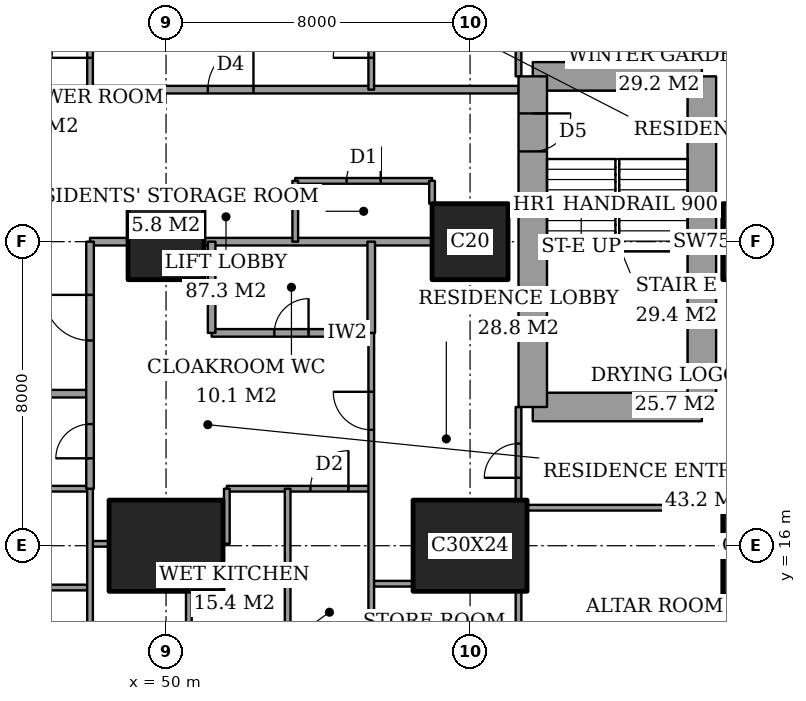
"""IFC4 building model, lengths in metres.
Left out: names, types, materials, properties, quantities, classifications, styles, units other than length and angle.
Written with IfcOpenShell. Run it as: python <this file> out.ifc"""

import sys

from ifc_helpers import new_model, si_unit, direction, frame, frame_2d, origin, origin_2d, place, context, subcontext, project, spatial, rectangle, extrude, element, fill, save


model = new_model("IFC4")
c1 = context("Model", 3, precision=1e-05, world=origin(), true_north=direction((0.0, 1.0)))
c2 = subcontext(c1, "Body", "Model", "MODEL_VIEW")
j1 = project(units=[si_unit("LENGTHUNIT", "METRE"), si_unit("PLANEANGLEUNIT", "RADIAN")], contexts=[c1])
p1 = place(None, origin())
s1 = spatial("IfcSite", under=j1, at=p1, CompositionType="ELEMENT")
p2 = place(p1, origin())
s2 = spatial("IfcBuilding", under=s1, at=p2, CompositionType="ELEMENT")
p3 = place(p2, frame((0.0, 0.0, 161.0)))
s3 = spatial("IfcBuildingStorey", under=s2, at=p3, CompositionType="ELEMENT", Elevation=161.0)
p4 = place(p3, frame((50.0, 16.0, 0.0), z_axis=(0.0, 0.0, 1.0), x_axis=(1.0, 0.0, 0.0)))
e1 = element("IfcColumn", 1, at=p4, inside=s3, PredefinedType="COLUMN", context=c2, shape_type="SweptSolid", body=[
    extrude(rectangle(XDim=3.0, YDim=2.4, at=origin_2d()), origin(), (0.0, 0.0, 1.0), 3.6),
])
p5 = place(p3, frame((50.0, 24.0, 0.0), z_axis=(0.0, 0.0, 1.0), x_axis=(1.0, 0.0, 0.0)))
e2 = element("IfcColumn", 2, at=p5, inside=s3, PredefinedType="COLUMN", context=c2, shape_type="SweptSolid", body=[
    extrude(rectangle(XDim=2.0, YDim=2.0, at=origin_2d()), origin(), (0.0, 0.0, 1.0), 3.6),
])
p6 = place(p3, frame((58.0, 16.0, 0.0), z_axis=(0.0, 0.0, 1.0), x_axis=(1.0, 0.0, 0.0)))
e3 = element("IfcColumn", 3, at=p6, inside=s3, PredefinedType="COLUMN", context=c2, shape_type="SweptSolid", body=[
    extrude(rectangle(XDim=3.0, YDim=2.4, at=origin_2d()), origin(), (0.0, 0.0, 1.0), 3.6),
])
p7 = place(p3, frame((58.0, 24.0, 0.0), z_axis=(0.0, 0.0, 1.0), x_axis=(1.0, 0.0, 0.0)))
e4 = element("IfcColumn", 4, at=p7, inside=s3, PredefinedType="COLUMN", context=c2, shape_type="SweptSolid", body=[
    extrude(rectangle(XDim=2.0, YDim=2.0, at=origin_2d()), origin(), (0.0, 0.0, 1.0), 3.6),
])
p8 = place(p3, frame((65.65, 16.0, 0.0), z_axis=(0.0, 0.0, 1.0), x_axis=(0.0, 1.0, 0.0)))
e5 = element("IfcColumn", 5, at=p8, inside=s3, PredefinedType="COLUMN", context=c2, shape_type="SweptSolid", body=[
    extrude(rectangle(XDim=2.6, YDim=2.0, at=origin_2d()), origin(), (0.0, 0.0, 1.0), 3.6),
])
p9 = place(p3, frame((65.65, 24.0, 0.0), z_axis=(0.0, 0.0, 1.0), x_axis=(1.0, 0.0, 0.0)))
e6 = element("IfcColumn", 6, at=p9, inside=s3, PredefinedType="COLUMN", context=c2, shape_type="SweptSolid", body=[
    extrude(rectangle(XDim=2.0, YDim=2.0, at=origin_2d()), origin(), (0.0, 0.0, 1.0), 3.6),
])
p10 = place(p3, frame((59.65, 19.65, 0.0), z_axis=(0.0, 0.0, 1.0), x_axis=(1.0, 0.0, 0.0)))
e7 = element("IfcWall", 7, at=p10, inside=s3, PredefinedType="SHEAR", context=c2, shape_type="SweptSolid", body=[
    extrude(rectangle(XDim=4.45, YDim=0.75, at=frame_2d((2.225, 0.0))), origin(), (0.0, 0.0, 1.0), 3.6),
])
p11 = place(p3, frame((64.1, 19.65, 0.0), z_axis=(0.0, 0.0, 1.0), x_axis=(0.0, 1.0, 0.0)))
e8 = element("IfcWall", 8, at=p11, inside=s3, PredefinedType="SHEAR", context=c2, shape_type="SweptSolid", body=[
    extrude(rectangle(XDim=8.7, YDim=0.75, at=frame_2d((4.35, 0.0))), origin(), (0.0, 0.0, 1.0), 3.6),
])
p12 = place(p3, frame((64.1, 28.35, 0.0), z_axis=(0.0, 0.0, 1.0), x_axis=(-1.0, 0.0, 0.0)))
e9 = element("IfcWall", 9, at=p12, inside=s3, PredefinedType="SHEAR", context=c2, shape_type="SweptSolid", body=[
    extrude(rectangle(XDim=4.45, YDim=0.75, at=frame_2d((2.225, 0.0))), origin(), (0.0, 0.0, 1.0), 3.6),
])
p13 = place(p3, frame((59.65, 28.35, 0.0), z_axis=(0.0, 0.0, 1.0), x_axis=(0.0, -1.0, 0.0)))
e10 = element("IfcWall", 10, at=p13, inside=s3, PredefinedType="SHEAR", context=c2, shape_type="SweptSolid", body=[
    extrude(rectangle(XDim=8.7, YDim=0.75, at=frame_2d((4.35, 0.0))), origin(), (0.0, 0.0, 1.0), 3.6),
])
p14 = place(p13, frame((0.975, 0.0, 0.0)))
e11 = element("IfcOpeningElement", 11, at=p14, cuts=e10, PredefinedType="OPENING", context=c2, shape_type="SweptSolid", body=[
    extrude(rectangle(XDim=1.0, YDim=2.1, at=frame_2d((0.5, 1.05))), frame((0.0, 0.385, 0.0), z_axis=(0.0, -1.0, 0.0), x_axis=(1.0, 0.0, 0.0)), (0.0, 0.0, 1.0), 0.77),
])
p15 = place(p3, frame((45.6, 14.9, 0.0), z_axis=(0.0, 0.0, 1.0), x_axis=(1.0, 0.0, 0.0)))
e12 = element("IfcWall", 12, at=p15, inside=s3, PredefinedType="PARTITIONING", context=c2, shape_type="SweptSolid", body=[
    extrude(rectangle(XDim=2.4, YDim=0.15, at=frame_2d((1.2, 0.0))), origin(), (0.0, 0.0, 1.0), 3.35),
])
p16 = place(p3, frame((55.4, 15.0, 0.0), z_axis=(0.0, 0.0, 1.0), x_axis=(1.0, 0.0, 0.0)))
e13 = element("IfcWall", 13, at=p16, inside=s3, PredefinedType="PARTITIONING", context=c2, shape_type="SweptSolid", body=[
    extrude(rectangle(XDim=1.1, YDim=0.15, at=frame_2d((0.55, 0.0))), origin(), (0.0, 0.0, 1.0), 3.35),
])
p17 = place(p3, frame((48.0, 16.05, 0.0), z_axis=(0.0, 0.0, 1.0), x_axis=(1.0, 0.0, 0.0)))
e14 = element("IfcWall", 14, at=p17, inside=s3, PredefinedType="PARTITIONING", context=c2, shape_type="SweptSolid", body=[
    extrude(rectangle(XDim=0.5, YDim=0.15, at=frame_2d((0.25, 0.0))), origin(), (0.0, 0.0, 1.0), 2.634),
])
p18 = place(p3, frame((59.5, 17.0, 0.0), z_axis=(0.0, 0.0, 1.0), x_axis=(1.0, 0.0, 0.0)))
e15 = element("IfcWall", 15, at=p18, inside=s3, PredefinedType="PARTITIONING", context=c2, shape_type="SweptSolid", body=[
    extrude(rectangle(XDim=5.15, YDim=0.15, at=frame_2d((2.575, 0.0))), origin(), (0.0, 0.0, 1.0), 3.35),
])
p19 = place(p3, frame((42.0, 17.5, 0.0), z_axis=(0.0, 0.0, 1.0), x_axis=(1.0, 0.0, 0.0)))
e16 = element("IfcWall", 16, at=p19, inside=s3, PredefinedType="PARTITIONING", context=c2, shape_type="SweptSolid", body=[
    extrude(rectangle(XDim=6.0, YDim=0.15, at=frame_2d((3.0, 0.0))), origin(), (0.0, 0.0, 1.0), 3.35),
])
p20 = place(p3, frame((51.6, 17.5, 0.0), z_axis=(0.0, 0.0, 1.0), x_axis=(1.0, 0.0, 0.0)))
e17 = element("IfcWall", 17, at=p20, inside=s3, PredefinedType="PARTITIONING", context=c2, shape_type="SweptSolid", body=[
    extrude(rectangle(XDim=3.8, YDim=0.15, at=frame_2d((1.9, 0.0))), origin(), (0.0, 0.0, 1.0), 3.35),
])
p21 = place(p20, frame((2.2, 0.0, 0.0)))
e18 = element("IfcOpeningElement", 18, at=p21, cuts=e17, PredefinedType="OPENING", context=c2, shape_type="SweptSolid", body=[
    extrude(rectangle(XDim=1.0, YDim=2.1, at=frame_2d((0.5, 1.05))), frame((0.0, 0.085, 0.0), z_axis=(0.0, -1.0, 0.0), x_axis=(1.0, 0.0, 0.0)), (0.0, 0.0, 1.0), 0.17),
])
p22 = place(p3, frame((42.0, 20.0, 0.0), z_axis=(0.0, 0.0, 1.0), x_axis=(1.0, 0.0, 0.0)))
e19 = element("IfcWall", 19, at=p22, inside=s3, PredefinedType="PARTITIONING", context=c2, shape_type="SweptSolid", body=[
    extrude(rectangle(XDim=6.0, YDim=0.2, at=frame_2d((3.0, 0.0))), origin(), (0.0, 0.0, 1.0), 3.35),
])
p23 = place(p3, frame((51.2, 21.6, 0.0), z_axis=(0.0, 0.0, 1.0), x_axis=(1.0, 0.0, 0.0)))
e20 = element("IfcWall", 20, at=p23, inside=s3, PredefinedType="PARTITIONING", context=c2, shape_type="SweptSolid", body=[
    extrude(rectangle(XDim=4.2, YDim=0.2, at=frame_2d((2.1, 0.0))), origin(), (0.0, 0.0, 1.0), 3.35),
])
p24 = place(p23, frame((1.65, 0.0, 0.0)))
e21 = element("IfcOpeningElement", 21, at=p24, cuts=e20, PredefinedType="OPENING", context=c2, shape_type="SweptSolid", body=[
    extrude(rectangle(XDim=0.9, YDim=2.1, at=frame_2d((0.45, 1.05))), frame((0.0, 0.11, 0.0), z_axis=(0.0, -1.0, 0.0), x_axis=(1.0, 0.0, 0.0)), (0.0, 0.0, 1.0), 0.22),
])
p25 = place(p3, frame((48.0, 24.0, 0.0), z_axis=(0.0, 0.0, 1.0), x_axis=(1.0, 0.0, 0.0)))
e22 = element("IfcWall", 22, at=p25, inside=s3, PredefinedType="PARTITIONING", context=c2, shape_type="SweptSolid", body=[
    extrude(rectangle(XDim=1.0, YDim=0.2, at=frame_2d((0.5, 0.0))), origin(), (0.0, 0.0, 1.0), 3.35),
])
p26 = place(p3, frame((51.0, 24.0, 0.0), z_axis=(0.0, 0.0, 1.0), x_axis=(1.0, 0.0, 0.0)))
e23 = element("IfcWall", 23, at=p26, inside=s3, PredefinedType="PARTITIONING", context=c2, shape_type="SweptSolid", body=[
    extrude(rectangle(XDim=6.0, YDim=0.2, at=frame_2d((3.0, 0.0))), origin(), (0.0, 0.0, 1.0), 3.35),
])
p27 = place(p3, frame((53.4, 25.6, 0.0), z_axis=(0.0, 0.0, 1.0), x_axis=(1.0, 0.0, 0.0)))
e24 = element("IfcWall", 24, at=p27, inside=s3, PredefinedType="PARTITIONING", context=c2, shape_type="SweptSolid", body=[
    extrude(rectangle(XDim=3.6, YDim=0.15, at=frame_2d((1.8, 0.0))), origin(), (0.0, 0.0, 1.0), 3.35),
])
p28 = place(p27, frame((1.35, 0.0, 0.0)))
e25 = element("IfcOpeningElement", 25, at=p28, cuts=e24, PredefinedType="OPENING", context=c2, shape_type="SweptSolid", body=[
    extrude(rectangle(XDim=0.9, YDim=2.1, at=frame_2d((0.45, 1.05))), frame((0.0, 0.085, 0.0), z_axis=(0.0, -1.0, 0.0), x_axis=(1.0, 0.0, 0.0)), (0.0, 0.0, 1.0), 0.17),
])
p29 = place(p3, frame((42.0, 28.0, 0.0), z_axis=(0.0, 0.0, 1.0), x_axis=(1.0, 0.0, 0.0)))
e26 = element("IfcWall", 26, at=p29, inside=s3, PredefinedType="PARTITIONING", context=c2, shape_type="SweptSolid", body=[
    extrude(rectangle(XDim=17.275, YDim=0.2, at=frame_2d((8.637, 0.0))), origin(), (0.0, 0.0, 1.0), 3.35),
])
p30 = place(p29, frame((9.1, 0.0, 0.0)))
e27 = element("IfcOpeningElement", 27, at=p30, cuts=e26, PredefinedType="OPENING", context=c2, shape_type="SweptSolid", body=[
    extrude(rectangle(XDim=1.2, YDim=2.4, at=frame_2d((0.6, 1.2))), frame((0.0, 0.11, 0.0), z_axis=(0.0, -1.0, 0.0), x_axis=(1.0, 0.0, 0.0)), (0.0, 0.0, 1.0), 0.22),
])
p31 = place(p3, frame((48.0, 17.5, 0.0), z_axis=(0.0, 0.0, 1.0), x_axis=(0.0, 1.0, 0.0)))
e28 = element("IfcWall", 28, at=p31, inside=s3, PredefinedType="PARTITIONING", context=c2, shape_type="SweptSolid", body=[
    extrude(rectangle(XDim=6.5, YDim=0.2, at=frame_2d((3.25, 0.0))), origin(), (0.0, 0.0, 1.0), 3.35),
])
p32 = place(p31, frame((3.9, 0.0, 0.0)))
e29 = element("IfcOpeningElement", 29, at=p32, cuts=e28, PredefinedType="OPENING", context=c2, shape_type="SweptSolid", body=[
    extrude(rectangle(XDim=1.2, YDim=2.4, at=frame_2d((0.6, 1.2))), frame((0.0, 0.11, 0.0), z_axis=(0.0, -1.0, 0.0), x_axis=(1.0, 0.0, 0.0)), (0.0, 0.0, 1.0), 0.22),
])
p33 = place(p31, frame((0.8, 0.0, 0.0)))
e30 = element("IfcOpeningElement", 30, at=p33, cuts=e28, PredefinedType="OPENING", context=c2, shape_type="SweptSolid", body=[
    extrude(rectangle(XDim=0.9, YDim=2.1, at=frame_2d((0.45, 1.05))), frame((0.0, 0.11, 0.0), z_axis=(0.0, -1.0, 0.0), x_axis=(1.0, 0.0, 0.0)), (0.0, 0.0, 1.0), 0.22),
])
p34 = place(p3, frame((48.0, 11.0, 0.0), z_axis=(0.0, 0.0, 1.0), x_axis=(0.0, 1.0, 0.0)))
e31 = element("IfcWall", 31, at=p34, inside=s3, PredefinedType="PARTITIONING", context=c2, shape_type="SweptSolid", body=[
    extrude(rectangle(XDim=6.5, YDim=0.15, at=frame_2d((3.25, 0.0))), origin(), (0.0, 0.0, 1.0), 3.35),
])
p35 = place(p3, frame((48.0, 28.0, 0.0), z_axis=(0.0, 0.0, 1.0), x_axis=(0.0, 1.0, 0.0)))
e32 = element("IfcWall", 32, at=p35, inside=s3, PredefinedType="PARTITIONING", context=c2, shape_type="SweptSolid", body=[
    extrude(rectangle(XDim=9.4, YDim=0.15, at=frame_2d((4.7, 0.0))), origin(), (0.0, 0.0, 1.0), 3.35),
])
p36 = place(p35, frame((0.837, 0.0, 0.0)))
e33 = element("IfcOpeningElement", 33, at=p36, cuts=e32, PredefinedType="OPENING", context=c2, shape_type="SweptSolid", body=[
    extrude(rectangle(XDim=1.0, YDim=2.1, at=frame_2d((0.5, 1.05))), frame((0.0, 0.085, 0.0), z_axis=(0.0, -1.0, 0.0), x_axis=(1.0, 0.0, 0.0)), (0.0, 0.0, 1.0), 0.17),
])
p37 = place(p3, frame((50.6, 11.0, 0.0), z_axis=(0.0, 0.0, 1.0), x_axis=(0.0, 1.0, 0.0)))
e34 = element("IfcWall", 34, at=p37, inside=s3, PredefinedType="PARTITIONING", context=c2, shape_type="SweptSolid", body=[
    extrude(rectangle(XDim=3.8, YDim=0.15, at=frame_2d((1.9, 0.0))), origin(), (0.0, 0.0, 1.0), 3.35),
])
p38 = place(p3, frame((51.2, 21.6, 0.0), z_axis=(0.0, 0.0, 1.0), x_axis=(0.0, 1.0, 0.0)))
e35 = element("IfcWall", 35, at=p38, inside=s3, PredefinedType="PARTITIONING", context=c2, shape_type="SweptSolid", body=[
    extrude(rectangle(XDim=2.4, YDim=0.2, at=frame_2d((1.2, 0.0))), origin(), (0.0, 0.0, 1.0), 3.35),
])
p39 = place(p3, frame((51.6, 16.05, 0.0), z_axis=(0.0, 0.0, 1.0), x_axis=(0.0, 1.0, 0.0)))
e36 = element("IfcWall", 36, at=p39, inside=s3, PredefinedType="PARTITIONING", context=c2, shape_type="SweptSolid", body=[
    extrude(rectangle(XDim=1.45, YDim=0.15, at=frame_2d((0.725, 0.0))), origin(), (0.0, 0.0, 1.0), 3.35),
])
p40 = place(p3, frame((53.2, 11.0, 0.0), z_axis=(0.0, 0.0, 1.0), x_axis=(0.0, 1.0, 0.0)))
e37 = element("IfcWall", 37, at=p40, inside=s3, PredefinedType="PARTITIONING", context=c2, shape_type="SweptSolid", body=[
    extrude(rectangle(XDim=6.5, YDim=0.15, at=frame_2d((3.25, 0.0))), origin(), (0.0, 0.0, 1.0), 3.35),
])
p41 = place(p3, frame((53.4, 24.0, 0.0), z_axis=(0.0, 0.0, 1.0), x_axis=(0.0, 1.0, 0.0)))
e38 = element("IfcWall", 38, at=p41, inside=s3, PredefinedType="PARTITIONING", context=c2, shape_type="SweptSolid", body=[
    extrude(rectangle(XDim=1.6, YDim=0.15, at=frame_2d((0.8, 0.0))), origin(), (0.0, 0.0, 1.0), 3.35),
])
p42 = place(p3, frame((55.4, 21.6, 0.0), z_axis=(0.0, 0.0, 1.0), x_axis=(0.0, 1.0, 0.0)))
e39 = element("IfcWall", 39, at=p42, inside=s3, PredefinedType="PARTITIONING", context=c2, shape_type="SweptSolid", body=[
    extrude(rectangle(XDim=2.4, YDim=0.2, at=frame_2d((1.2, 0.0))), origin(), (0.0, 0.0, 1.0), 3.35),
])
p43 = place(p3, frame((55.4, 11.0, 0.0), z_axis=(0.0, 0.0, 1.0), x_axis=(0.0, 1.0, 0.0)))
e40 = element("IfcWall", 40, at=p43, inside=s3, PredefinedType="PARTITIONING", context=c2, shape_type="SweptSolid", body=[
    extrude(rectangle(XDim=10.6, YDim=0.15, at=frame_2d((5.3, 0.0))), origin(), (0.0, 0.0, 1.0), 3.35),
])
p44 = place(p43, frame((8.05, 0.0, 0.0)))
e41 = element("IfcOpeningElement", 41, at=p44, cuts=e40, PredefinedType="OPENING", context=c2, shape_type="SweptSolid", body=[
    extrude(rectangle(XDim=1.0, YDim=2.1, at=frame_2d((0.5, 1.05))), frame((0.0, 0.085, 0.0), z_axis=(0.0, -1.0, 0.0), x_axis=(1.0, 0.0, 0.0)), (0.0, 0.0, 1.0), 0.17),
])
p45 = place(p3, frame((55.4, 28.0, 0.0), z_axis=(0.0, 0.0, 1.0), x_axis=(0.0, 1.0, 0.0)))
e42 = element("IfcWall", 42, at=p45, inside=s3, PredefinedType="PARTITIONING", context=c2, shape_type="SweptSolid", body=[
    extrude(rectangle(XDim=9.4, YDim=0.15, at=frame_2d((4.7, 0.0))), origin(), (0.0, 0.0, 1.0), 3.35),
])
p46 = place(p45, frame((0.837, 0.0, 0.0)))
e43 = element("IfcOpeningElement", 43, at=p46, cuts=e42, PredefinedType="OPENING", context=c2, shape_type="SweptSolid", body=[
    extrude(rectangle(XDim=1.0, YDim=2.1, at=frame_2d((0.5, 1.05))), frame((0.0, 0.085, 0.0), z_axis=(0.0, -1.0, 0.0), x_axis=(1.0, 0.0, 0.0)), (0.0, 0.0, 1.0), 0.17),
])
p47 = place(p3, frame((57.0, 25.0, 0.0), z_axis=(0.0, 0.0, 1.0), x_axis=(0.0, 1.0, 0.0)))
e44 = element("IfcWall", 44, at=p47, inside=s3, PredefinedType="PARTITIONING", context=c2, shape_type="SweptSolid", body=[
    extrude(rectangle(XDim=0.6, YDim=0.15, at=frame_2d((0.3, 0.0))), origin(), (0.0, 0.0, 1.0), 3.35),
])
p48 = place(p3, frame((59.275, 11.0, 0.0), z_axis=(0.0, 0.0, 1.0), x_axis=(0.0, 1.0, 0.0)))
e45 = element("IfcWall", 45, at=p48, inside=s3, PredefinedType="PARTITIONING", context=c2, shape_type="SweptSolid", body=[
    extrude(rectangle(XDim=3.8, YDim=0.15, at=frame_2d((1.9, 0.0))), origin(), (0.0, 0.0, 1.0), 3.35),
])
p49 = place(p3, frame((59.275, 17.2, 0.0), z_axis=(0.0, 0.0, 1.0), x_axis=(0.0, 1.0, 0.0)))
e46 = element("IfcWall", 46, at=p49, inside=s3, PredefinedType="PARTITIONING", context=c2, shape_type="SweptSolid", body=[
    extrude(rectangle(XDim=2.45, YDim=0.15, at=frame_2d((1.225, 0.0))), origin(), (0.0, 0.0, 1.0), 3.35),
])
p50 = place(p49, frame((0.587, 0.0, 0.0)))
e47 = element("IfcOpeningElement", 47, at=p50, cuts=e46, PredefinedType="OPENING", context=c2, shape_type="SweptSolid", body=[
    extrude(rectangle(XDim=0.9, YDim=2.1, at=frame_2d((0.45, 1.05))), frame((0.0, 0.085, 0.0), z_axis=(0.0, -1.0, 0.0), x_axis=(1.0, 0.0, 0.0)), (0.0, 0.0, 1.0), 0.17),
])
p51 = place(p3, frame((59.275, 28.35, 0.0), z_axis=(0.0, 0.0, 1.0), x_axis=(0.0, 1.0, 0.0)))
e48 = element("IfcWall", 48, at=p51, inside=s3, PredefinedType="PARTITIONING", context=c2, shape_type="SweptSolid", body=[
    extrude(rectangle(XDim=2.45, YDim=0.15, at=frame_2d((1.225, 0.0))), origin(), (0.0, 0.0, 1.0), 3.35),
])
p52 = place(p51, frame((0.913, 0.0, 0.0)))
e49 = element("IfcOpeningElement", 49, at=p52, cuts=e48, PredefinedType="OPENING", context=c2, shape_type="SweptSolid", body=[
    extrude(rectangle(XDim=1.0, YDim=2.1, at=frame_2d((0.5, 1.05))), frame((0.0, 0.085, 0.0), z_axis=(0.0, -1.0, 0.0), x_axis=(1.0, 0.0, 0.0)), (0.0, 0.0, 1.0), 0.17),
])
p53 = place(p50, origin())
e50 = element("IfcDoor", 50, at=p53, inside=s3, OperationType="SINGLE_SWING_RIGHT", PredefinedType="DOOR", context=c2, shape_type="SweptSolid", body=[
    extrude(rectangle(XDim=0.9, YDim=2.1, at=frame_2d((0.45, 1.05))), frame((0.0, 0.025, 0.0), z_axis=(0.0, -1.0, 0.0), x_axis=(1.0, 0.0, 0.0)), (0.0, 0.0, 1.0), 0.05),
])
fill(e47, e50)
p54 = place(p44, origin())
e51 = element("IfcDoor", 51, at=p54, inside=s3, OperationType="SINGLE_SWING_LEFT", PredefinedType="DOOR", context=c2, shape_type="SweptSolid", body=[
    extrude(rectangle(XDim=1.0, YDim=2.1, at=frame_2d((0.5, 1.05))), frame((0.0, 0.025, 0.0), z_axis=(0.0, -1.0, 0.0), x_axis=(1.0, 0.0, 0.0)), (0.0, 0.0, 1.0), 0.05),
])
fill(e41, e51)
p55 = place(p24, origin())
e52 = element("IfcDoor", 52, at=p55, inside=s3, OperationType="SINGLE_SWING_LEFT", PredefinedType="DOOR", context=c2, shape_type="SweptSolid", body=[
    extrude(rectangle(XDim=0.9, YDim=2.1, at=frame_2d((0.45, 1.05))), frame((0.0, 0.025, 0.0), z_axis=(0.0, -1.0, 0.0), x_axis=(1.0, 0.0, 0.0)), (0.0, 0.0, 1.0), 0.05),
])
fill(e21, e52)
p56 = place(p32, origin())
e53 = element("IfcDoor", 53, at=p56, inside=s3, OperationType="SINGLE_SWING_LEFT", PredefinedType="DOOR", context=c2, shape_type="SweptSolid", body=[
    extrude(rectangle(XDim=1.2, YDim=2.4, at=frame_2d((0.6, 1.2))), frame((0.0, 0.025, 0.0), z_axis=(0.0, -1.0, 0.0), x_axis=(1.0, 0.0, 0.0)), (0.0, 0.0, 1.0), 0.05),
])
fill(e29, e53)
p57 = place(p21, origin())
e54 = element("IfcDoor", 54, at=p57, inside=s3, OperationType="SINGLE_SWING_LEFT", PredefinedType="DOOR", context=c2, shape_type="SweptSolid", body=[
    extrude(rectangle(XDim=1.0, YDim=2.1, at=frame_2d((0.5, 1.05))), frame((0.0, 0.025, 0.0), z_axis=(0.0, -1.0, 0.0), x_axis=(1.0, 0.0, 0.0)), (0.0, 0.0, 1.0), 0.05),
])
fill(e18, e54)
p58 = place(p33, origin())
e55 = element("IfcDoor", 55, at=p58, inside=s3, OperationType="SINGLE_SWING_RIGHT", PredefinedType="DOOR", context=c2, shape_type="SweptSolid", body=[
    extrude(rectangle(XDim=0.9, YDim=2.1, at=frame_2d((0.45, 1.05))), frame((0.0, 0.025, 0.0), z_axis=(0.0, -1.0, 0.0), x_axis=(1.0, 0.0, 0.0)), (0.0, 0.0, 1.0), 0.05),
])
fill(e30, e55)
p59 = place(p46, origin())
e56 = element("IfcDoor", 56, at=p59, inside=s3, OperationType="SINGLE_SWING_RIGHT", PredefinedType="DOOR", context=c2, shape_type="SweptSolid", body=[
    extrude(rectangle(XDim=1.0, YDim=2.1, at=frame_2d((0.5, 1.05))), frame((0.0, 0.025, 0.0), z_axis=(0.0, -1.0, 0.0), x_axis=(1.0, 0.0, 0.0)), (0.0, 0.0, 1.0), 0.05),
])
fill(e43, e56)
p60 = place(p30, origin())
e57 = element("IfcDoor", 57, at=p60, inside=s3, OperationType="SINGLE_SWING_LEFT", PredefinedType="DOOR", context=c2, shape_type="SweptSolid", body=[
    extrude(rectangle(XDim=1.2, YDim=2.4, at=frame_2d((0.6, 1.2))), frame((0.0, 0.025, 0.0), z_axis=(0.0, -1.0, 0.0), x_axis=(1.0, 0.0, 0.0)), (0.0, 0.0, 1.0), 0.05),
])
fill(e27, e57)
p61 = place(p36, origin())
e58 = element("IfcDoor", 58, at=p61, inside=s3, OperationType="SINGLE_SWING_RIGHT", PredefinedType="DOOR", context=c2, shape_type="SweptSolid", body=[
    extrude(rectangle(XDim=1.0, YDim=2.1, at=frame_2d((0.5, 1.05))), frame((0.0, 0.025, 0.0), z_axis=(0.0, -1.0, 0.0), x_axis=(1.0, 0.0, 0.0)), (0.0, 0.0, 1.0), 0.05),
])
fill(e33, e58)
p62 = place(p28, origin())
e59 = element("IfcDoor", 59, at=p62, inside=s3, OperationType="SINGLE_SWING_LEFT", PredefinedType="DOOR", context=c2, shape_type="SweptSolid", body=[
    extrude(rectangle(XDim=0.9, YDim=2.1, at=frame_2d((0.45, 1.05))), frame((0.0, 0.025, 0.0), z_axis=(0.0, -1.0, 0.0), x_axis=(1.0, 0.0, 0.0)), (0.0, 0.0, 1.0), 0.05),
])
fill(e25, e59)
p63 = place(p14, origin())
e60 = element("IfcDoor", 60, at=p63, inside=s3, OperationType="SINGLE_SWING_RIGHT", PredefinedType="DOOR", context=c2, shape_type="SweptSolid", body=[
    extrude(rectangle(XDim=1.0, YDim=2.1, at=frame_2d((0.5, 1.05))), frame((0.0, 0.025, 0.0), z_axis=(0.0, -1.0, 0.0), x_axis=(1.0, 0.0, 0.0)), (0.0, 0.0, 1.0), 0.05),
])
fill(e11, e60)
save(model, sys.argv[1])
